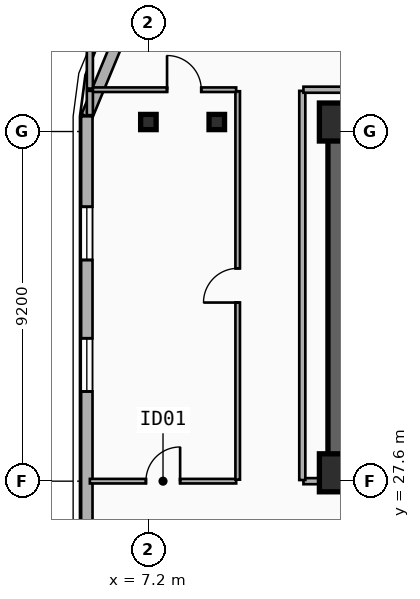
"""IFC4 building model, lengths in metres.
Left out: names, types, materials, properties, quantities, classifications, styles, units other than length and angle.
Written with IfcOpenShell. Run it as: python <this file> out.ifc"""

import sys

from ifc_helpers import new_model, si_unit, direction, frame, frame_2d, origin, origin_2d, place, context, subcontext, project, spatial, rectangle, i_section, extrude, element, fill, save


model = new_model("IFC4")
c1 = context("Model", 3, precision=1e-05, world=origin(), true_north=direction((0.0, 1.0)))
c2 = subcontext(c1, "Body", "Model", "MODEL_VIEW")
j1 = project(units=[si_unit("LENGTHUNIT", "METRE"), si_unit("PLANEANGLEUNIT", "RADIAN")], contexts=[c1])
p1 = place(None, origin())
s1 = spatial("IfcSite", under=j1, at=p1, CompositionType="ELEMENT")
p2 = place(p1, origin())
s2 = spatial("IfcBuilding", under=s1, at=p2, CompositionType="ELEMENT")
p3 = place(p2, frame((0.0, 0.0, 222.0)))
s3 = spatial("IfcBuildingStorey", under=s2, at=p3, CompositionType="ELEMENT", Elevation=222.0)
p4 = place(p3, frame((12.15, 37.05, 0.0), z_axis=(0.0, 0.0, 1.0), x_axis=(1.0, 0.0, 0.0)))
e1 = element("IfcWall", 1, at=p4, inside=s3, PredefinedType="SHEAR", context=c2, shape_type="SweptSolid", body=[
    extrude(rectangle(XDim=33.23, YDim=0.45, at=frame_2d((16.615, 0.0))), origin(), (0.0, 0.0, 1.0), 3.6),
])
p5 = place(p3, frame((21.18, 27.82, 0.0), z_axis=(0.0, 0.0, 1.0), x_axis=(-1.0, 0.0, 0.0)))
e2 = element("IfcWall", 2, at=p5, inside=s3, PredefinedType="SHEAR", context=c2, shape_type="SweptSolid", body=[
    extrude(rectangle(XDim=9.03, YDim=0.45, at=frame_2d((4.515, 0.0))), origin(), (0.0, 0.0, 1.0), 3.6),
])
p6 = place(p5, frame((2.68, 0.0, 0.0)))
e3 = element("IfcOpeningElement", 3, at=p6, cuts=e2, PredefinedType="OPENING", context=c2, shape_type="SweptSolid", body=[
    extrude(rectangle(XDim=1.1, YDim=2.15, at=frame_2d((0.55, 1.075))), frame((0.0, 0.235, 0.0), z_axis=(0.0, -1.0, 0.0), x_axis=(1.0, 0.0, 0.0)), (0.0, 0.0, 1.0), 0.47),
])
p7 = place(p3, frame((12.15, 28.045, 0.0), z_axis=(0.0, 0.0, 1.0), x_axis=(0.0, 1.0, 0.0)))
e4 = element("IfcWall", 4, at=p7, inside=s3, PredefinedType="SHEAR", context=c2, shape_type="SweptSolid", body=[
    extrude(rectangle(XDim=8.78, YDim=0.45, at=frame_2d((4.39, 0.0))), origin(), (0.0, 0.0, 1.0), 3.6),
])
for number, where, z_axis, x_axis in (
    (5, (12.2, 27.82, 0.0), (0.0, 0.0, 1.0), (1.0, 0.0, 0.0)),
    (6, (12.2, 37.05, 0.0), (0.0, 0.0, 1.0), (1.0, 0.0, 0.0)),
):
    element("IfcColumn", number, at=place(p3, frame(where, z_axis=z_axis, x_axis=x_axis)), inside=s3, PredefinedType="COLUMN", context=c2, shape_type="SweptSolid", body=[
        extrude(rectangle(XDim=1.0, YDim=1.0, at=origin_2d()), origin(), (0.0, 0.0, 1.0), 3.6),
    ])
for number, where, z_axis, x_axis in (
    (7, (9.0, 37.05, 0.0), (0.0, 0.0, 1.0), (1.0, 0.0, 0.0)),
    (8, (7.2, 37.05, 0.0), (0.0, 0.0, 1.0), (1.0, 0.0, 0.0)),
):
    element("IfcColumn", number, at=place(p3, frame(where, z_axis=z_axis, x_axis=x_axis)), inside=s3, PredefinedType="COLUMN", context=c2, shape_type="SweptSolid", body=[
        extrude(i_section(OverallWidth=0.408, OverallDepth=0.4, WebThickness=0.025, FlangeThickness=0.039, FilletRadius=0.015, at=origin_2d()), origin(), (0.0, 0.0, 1.0), 3.6),
    ])
p8 = place(p3, frame((5.58, 37.2, 0.0), z_axis=(0.0, 0.0, 1.0), x_axis=(0.382636798336, 0.92389884758, 0.0)))
e9 = element("IfcWall", 9, at=p8, inside=s3, PredefinedType="SOLIDWALL", context=c2, shape_type="SweptSolid", body=[
    extrude(rectangle(XDim=3.077, YDim=0.3, at=frame_2d((1.538, 0.0))), origin(), (0.0, 0.0, 1.0), 3.34),
])
p9 = place(p3, frame((5.58, 8.6, 0.0), z_axis=(0.0, 0.0, 1.0), x_axis=(0.0, 1.0, 0.0)))
e10 = element("IfcWall", 10, at=p9, inside=s3, PredefinedType="SOLIDWALL", context=c2, shape_type="SweptSolid", body=[
    extrude(rectangle(XDim=28.6, YDim=0.3, at=frame_2d((14.3, 0.0))), origin(), (0.0, 0.0, 1.0), 3.34),
])
p10 = place(p9, frame((21.36, 0.0, 0.34)))
e11 = element("IfcOpeningElement", 11, at=p10, cuts=e10, PredefinedType="OPENING", context=c2, shape_type="SweptSolid", body=[
    extrude(rectangle(XDim=1.4, YDim=2.1, at=frame_2d((0.7, 1.05))), frame((0.0, 0.16, 0.0), z_axis=(0.0, -1.0, 0.0), x_axis=(1.0, 0.0, 0.0)), (0.0, 0.0, 1.0), 0.32),
])
p11 = place(p9, frame((24.82, 0.0, 0.34)))
e12 = element("IfcOpeningElement", 12, at=p11, cuts=e10, PredefinedType="OPENING", context=c2, shape_type="SweptSolid", body=[
    extrude(rectangle(XDim=1.4, YDim=2.1, at=frame_2d((0.7, 1.05))), frame((0.0, 0.16, 0.0), z_axis=(0.0, -1.0, 0.0), x_axis=(1.0, 0.0, 0.0)), (0.0, 0.0, 1.0), 0.32),
])
p12 = place(p9, frame((4.797, 0.0, 0.34)))
e13 = element("IfcOpeningElement", 13, at=p12, cuts=e10, PredefinedType="OPENING", context=c2, shape_type="SweptSolid", body=[
    extrude(rectangle(XDim=1.4, YDim=2.1, at=frame_2d((0.7, 1.05))), frame((0.0, 0.16, 0.0), z_axis=(0.0, -1.0, 0.0), x_axis=(1.0, 0.0, 0.0)), (0.0, 0.0, 1.0), 0.32),
])
p13 = place(p9, frame((10.673, 0.0, 0.34)))
e14 = element("IfcOpeningElement", 14, at=p13, cuts=e10, PredefinedType="OPENING", context=c2, shape_type="SweptSolid", body=[
    extrude(rectangle(XDim=1.4, YDim=2.1, at=frame_2d((0.7, 1.05))), frame((0.0, 0.16, 0.0), z_axis=(0.0, -1.0, 0.0), x_axis=(1.0, 0.0, 0.0)), (0.0, 0.0, 1.0), 0.32),
])
p14 = place(p3, frame((5.66, 27.6, 0.0), z_axis=(0.0, 0.0, 1.0), x_axis=(1.0, 0.0, 0.0)))
e15 = element("IfcWall", 15, at=p14, inside=s3, PredefinedType="PARTITIONING", context=c2, shape_type="SweptSolid", body=[
    extrude(rectangle(XDim=3.85, YDim=0.12, at=frame_2d((1.925, 0.0))), origin(), (0.0, 0.0, 1.0), 2.67),
])
p15 = place(p14, frame((1.475, 0.0, 0.0)))
e16 = element("IfcOpeningElement", 16, at=p15, cuts=e15, PredefinedType="OPENING", context=c2, shape_type="SweptSolid", body=[
    extrude(rectangle(XDim=0.9, YDim=2.1, at=frame_2d((0.45, 1.05))), frame((0.0, 0.07, 0.0), z_axis=(0.0, -1.0, 0.0), x_axis=(1.0, 0.0, 0.0)), (0.0, 0.0, 1.0), 0.14),
])
p16 = place(p3, frame((9.55, 27.64, 0.0), z_axis=(0.0, 0.0, 1.0), x_axis=(0.0, 1.0, 0.0)))
e17 = element("IfcWall", 17, at=p16, inside=s3, PredefinedType="PARTITIONING", context=c2, shape_type="SweptSolid", body=[
    extrude(rectangle(XDim=10.22, YDim=0.12, at=frame_2d((5.11, 0.0))), origin(), (0.0, 0.0, 1.0), 2.82),
])
p17 = place(p16, frame((4.66, 0.0, 0.0)))
e18 = element("IfcOpeningElement", 18, at=p17, cuts=e17, PredefinedType="OPENING", context=c2, shape_type="SweptSolid", body=[
    extrude(rectangle(XDim=0.9, YDim=2.1, at=frame_2d((0.45, 1.05))), frame((0.0, 0.07, 0.0), z_axis=(0.0, -1.0, 0.0), x_axis=(1.0, 0.0, 0.0)), (0.0, 0.0, 1.0), 0.14),
])
p18 = place(p3, frame((5.66, 37.9, 0.0), z_axis=(0.0, 0.0, 1.0), x_axis=(1.0, 0.0, 0.0)))
e19 = element("IfcWall", 19, at=p18, inside=s3, PredefinedType="PARTITIONING", context=c2, shape_type="SweptSolid", body=[
    extrude(rectangle(XDim=3.85, YDim=0.12, at=frame_2d((1.925, 0.0))), origin(), (0.0, 0.0, 1.0), 3.34),
])
p19 = place(p18, frame((2.031, 0.0, 0.0)))
e20 = element("IfcOpeningElement", 20, at=p19, cuts=e19, PredefinedType="OPENING", context=c2, shape_type="SweptSolid", body=[
    extrude(rectangle(XDim=0.9, YDim=2.1, at=frame_2d((0.45, 1.05))), frame((0.0, 0.07, 0.0), z_axis=(0.0, -1.0, 0.0), x_axis=(1.0, 0.0, 0.0)), (0.0, 0.0, 1.0), 0.14),
])
p20 = place(p3, frame((11.28, 27.6, 0.0), z_axis=(0.0, 0.0, 1.0), x_axis=(1.0, 0.0, 0.0)))
e21 = element("IfcWall", 21, at=p20, inside=s3, PredefinedType="PARTITIONING", context=c2, shape_type="SweptSolid", body=[
    extrude(rectangle(XDim=0.84, YDim=0.16, at=frame_2d((0.42, 0.0))), origin(), (0.0, 0.0, 1.0), 2.41),
])
p21 = place(p3, frame((11.25, 27.63, 0.0), z_axis=(0.0, 0.0, 1.0), x_axis=(0.0, 1.0, 0.0)))
e22 = element("IfcWall", 22, at=p21, inside=s3, PredefinedType="PARTITIONING", context=c2, shape_type="SweptSolid", body=[
    extrude(rectangle(XDim=10.24, YDim=0.16, at=frame_2d((5.12, 0.0))), origin(), (0.0, 0.0, 1.0), 2.82),
])
p22 = place(p3, frame((11.28, 37.9, 0.0), z_axis=(0.0, 0.0, 1.0), x_axis=(1.0, 0.0, 0.0)))
e23 = element("IfcWall", 23, at=p22, inside=s3, PredefinedType="PARTITIONING", context=c2, shape_type="SweptSolid", body=[
    extrude(rectangle(XDim=35.04, YDim=0.16, at=frame_2d((17.52, 0.0))), origin(), (0.0, 0.0, 1.0), 3.34),
])
p23 = place(p3, frame((5.66, 37.93, 0.0), z_axis=(0.0, 0.0, 1.0), x_axis=(0.0, 1.0, 0.0)))
e24 = element("IfcWall", 24, at=p23, inside=s3, PredefinedType="PARTITIONING", context=c2, shape_type="SweptSolid", body=[
    extrude(rectangle(XDim=1.44, YDim=0.16, at=frame_2d((0.72, 0.0))), origin(), (0.0, 0.0, 1.0), 3.34),
])
p24 = place(p3, frame((5.66, 37.23, 0.0), z_axis=(0.0, 0.0, 1.0), x_axis=(0.0, 1.0, 0.0)))
e25 = element("IfcWall", 25, at=p24, inside=s3, PredefinedType="PARTITIONING", context=c2, shape_type="SweptSolid", body=[
    extrude(rectangle(XDim=0.64, YDim=0.16, at=frame_2d((0.32, 0.0))), origin(), (0.0, 0.0, 1.0), 3.34),
])
p25 = place(p10, origin())
e26 = element("IfcWindow", 26, at=p25, inside=s3, PartitioningType="SINGLE_PANEL", PredefinedType="WINDOW", context=c2, shape_type="SweptSolid", body=[
    extrude(rectangle(XDim=1.4, YDim=2.1, at=frame_2d((0.7, 1.05))), frame((0.0, 0.03, 0.0), z_axis=(0.0, -1.0, 0.0), x_axis=(1.0, 0.0, 0.0)), (0.0, 0.0, 1.0), 0.06),
])
fill(e11, e26)
p26 = place(p11, origin())
e27 = element("IfcWindow", 27, at=p26, inside=s3, PartitioningType="SINGLE_PANEL", PredefinedType="WINDOW", context=c2, shape_type="SweptSolid", body=[
    extrude(rectangle(XDim=1.4, YDim=2.1, at=frame_2d((0.7, 1.05))), frame((0.0, 0.03, 0.0), z_axis=(0.0, -1.0, 0.0), x_axis=(1.0, 0.0, 0.0)), (0.0, 0.0, 1.0), 0.06),
])
fill(e12, e27)
p27 = place(p15, origin())
e28 = element("IfcDoor", 28, at=p27, inside=s3, OperationType="SINGLE_SWING_RIGHT", PredefinedType="DOOR", context=c2, shape_type="SweptSolid", body=[
    extrude(rectangle(XDim=0.9, YDim=2.1, at=frame_2d((0.45, 1.05))), frame((0.0, 0.025, 0.0), z_axis=(0.0, -1.0, 0.0), x_axis=(1.0, 0.0, 0.0)), (0.0, 0.0, 1.0), 0.05),
])
fill(e16, e28)
p28 = place(p17, origin())
e29 = element("IfcDoor", 29, at=p28, inside=s3, OperationType="SINGLE_SWING_LEFT", PredefinedType="DOOR", context=c2, shape_type="SweptSolid", body=[
    extrude(rectangle(XDim=0.9, YDim=2.1, at=frame_2d((0.45, 1.05))), frame((0.0, 0.025, 0.0), z_axis=(0.0, -1.0, 0.0), x_axis=(1.0, 0.0, 0.0)), (0.0, 0.0, 1.0), 0.05),
])
fill(e18, e29)
p29 = place(p19, origin())
e30 = element("IfcDoor", 30, at=p29, inside=s3, OperationType="SINGLE_SWING_LEFT", PredefinedType="DOOR", context=c2, shape_type="SweptSolid", body=[
    extrude(rectangle(XDim=0.9, YDim=2.1, at=frame_2d((0.45, 1.05))), frame((0.0, 0.025, 0.0), z_axis=(0.0, -1.0, 0.0), x_axis=(1.0, 0.0, 0.0)), (0.0, 0.0, 1.0), 0.05),
])
fill(e20, e30)
save(model, sys.argv[1])
